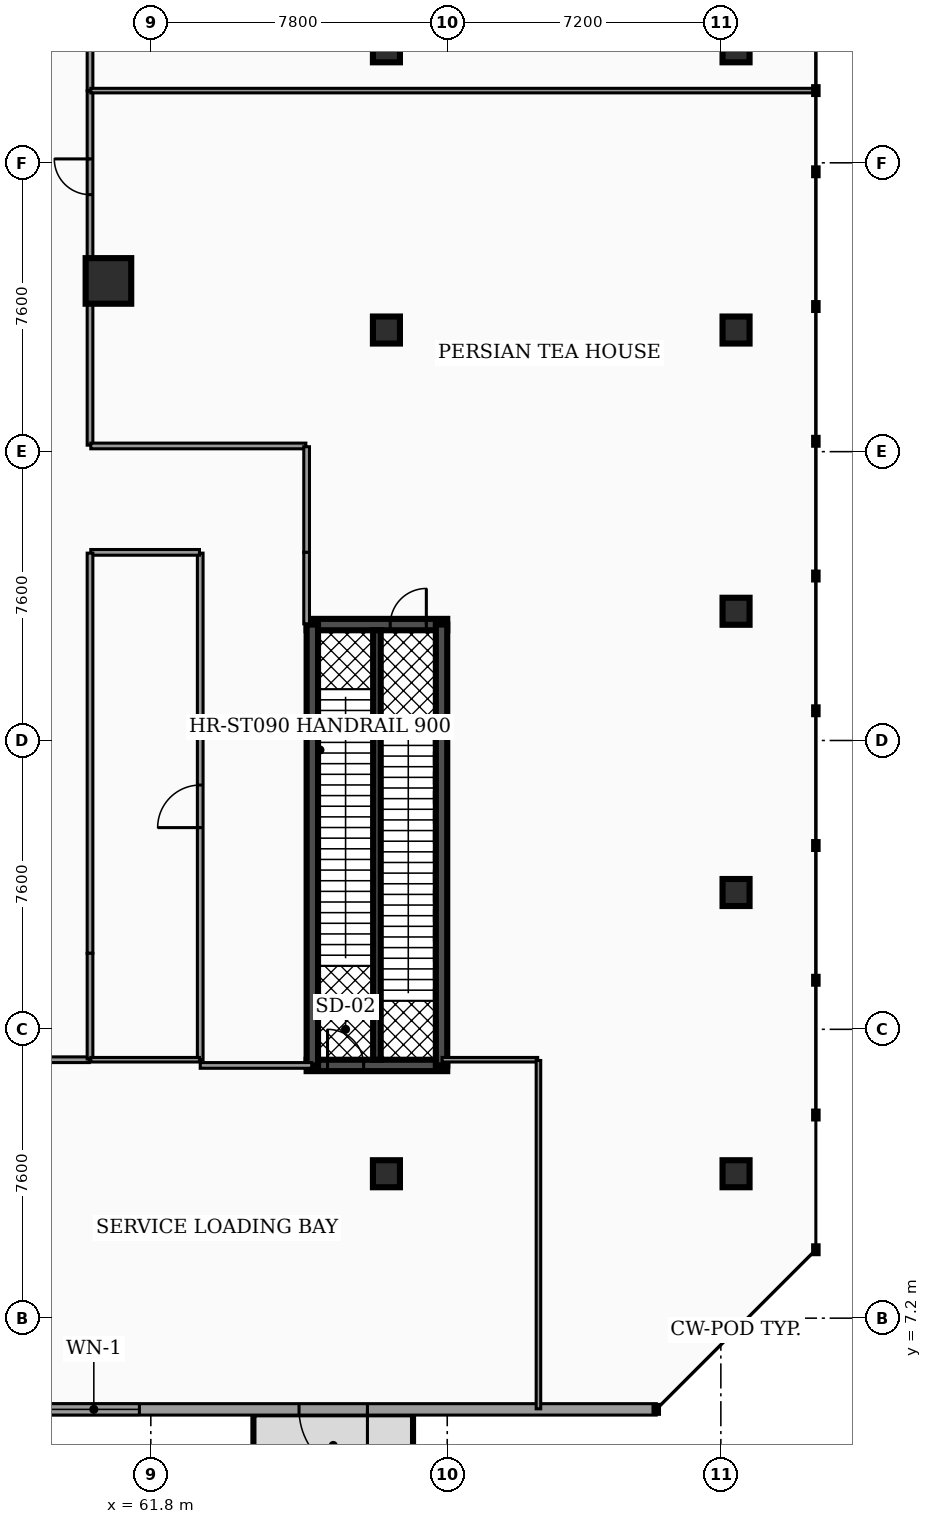
"""IFC4 building model, lengths in metres.
Left out: names, types, materials, properties, quantities, classifications, styles, units other than length and angle.
Written with IfcOpenShell. Run it as: python <this file> out.ifc"""

import sys

from ifc_helpers import new_model, si_unit, direction, frame, frame_2d, origin, origin_2d, place, context, subcontext, project, spatial, rectangle, hollow_rectangle, hollow_circle, extrude, element, fill, save


model = new_model("IFC4")
c1 = context("Model", 3, precision=1e-05, world=origin(), true_north=direction((0.0, 1.0)))
c2 = subcontext(c1, "Body", "Model", "MODEL_VIEW")
j1 = project(units=[si_unit("LENGTHUNIT", "METRE"), si_unit("PLANEANGLEUNIT", "RADIAN")], contexts=[c1])
p1 = place(None, origin())
s1 = spatial("IfcSite", under=j1, at=p1, CompositionType="ELEMENT")
p2 = place(p1, origin())
s2 = spatial("IfcBuilding", under=s1, at=p2, CompositionType="ELEMENT")
p3 = place(p2, origin())
s3 = spatial("IfcBuildingStorey", under=s2, at=p3, CompositionType="ELEMENT", Elevation=0.0)
p4 = place(p3, frame((65.9, 25.45, 0.0), z_axis=(0.0, 0.0, 1.0), x_axis=(1.0, 0.0, 0.0)))
e1 = element("IfcWall", 1, at=p4, inside=s3, PredefinedType="SHEAR", context=c2, shape_type="SweptSolid", body=[
    extrude(rectangle(XDim=3.7, YDim=0.3, at=frame_2d((1.85, 0.0))), origin(), (0.0, 0.0, 1.0), 4.82),
])
p5 = place(p4, frame((2.2, 0.0, 0.0)))
e2 = element("IfcOpeningElement", 2, at=p5, cuts=e1, PredefinedType="OPENING", context=c2, shape_type="SweptSolid", body=[
    extrude(rectangle(XDim=0.95, YDim=2.2, at=frame_2d((0.475, 1.1))), frame((0.0, 0.16, 0.0), z_axis=(0.0, -1.0, 0.0), x_axis=(1.0, 0.0, 0.0)), (0.0, 0.0, 1.0), 0.32),
])
p6 = place(p3, frame((65.9, 13.85, 0.0), z_axis=(0.0, 0.0, 1.0), x_axis=(1.0, 0.0, 0.0)))
e3 = element("IfcWall", 3, at=p6, inside=s3, PredefinedType="SHEAR", context=c2, shape_type="SweptSolid", body=[
    extrude(rectangle(XDim=3.7, YDim=0.3, at=frame_2d((1.85, 0.0))), origin(), (0.0, 0.0, 1.0), 4.82),
])
p7 = place(p6, frame((0.55, 0.0, 0.0)))
e4 = element("IfcOpeningElement", 4, at=p7, cuts=e3, PredefinedType="OPENING", context=c2, shape_type="SweptSolid", body=[
    extrude(rectangle(XDim=0.95, YDim=2.2, at=frame_2d((0.475, 1.1))), frame((0.0, 0.16, 0.0), z_axis=(0.0, -1.0, 0.0), x_axis=(1.0, 0.0, 0.0)), (0.0, 0.0, 1.0), 0.32),
])
for number, where, z_axis, x_axis in (
    (5, (66.05, 13.85, 0.0), (0.0, 0.0, 1.0), (0.0, 1.0, 0.0)),
    (6, (69.45, 13.85, 0.0), (0.0, 0.0, 1.0), (0.0, 1.0, 0.0)),
):
    element("IfcWall", number, at=place(p3, frame(where, z_axis=z_axis, x_axis=x_axis)), inside=s3, PredefinedType="SHEAR", context=c2, shape_type="SweptSolid", body=[
        extrude(rectangle(XDim=11.6, YDim=0.3, at=frame_2d((5.8, 0.0))), origin(), (0.0, 0.0, 1.0), 4.82),
    ])
p8 = place(p3, frame((67.75, 14.0, 0.0), z_axis=(0.0, 0.0, 1.0), x_axis=(0.0, 1.0, 0.0)))
e7 = element("IfcWall", 7, at=p8, inside=s3, PredefinedType="SHEAR", context=c2, shape_type="SweptSolid", body=[
    extrude(rectangle(XDim=11.3, YDim=0.2, at=frame_2d((5.65, 0.0))), origin(), (0.0, 0.0, 1.0), 4.82),
])
p9 = place(p3, frame((60.685, 34.492, 0.0), z_axis=(0.0, 0.0, 1.0), x_axis=(1.0, 0.0, 0.0)))
e8 = element("IfcColumn", 8, at=p9, inside=s3, PredefinedType="COLUMN", context=c2, shape_type="SweptSolid", body=[
    extrude(hollow_rectangle(XDim=1.2, YDim=1.2, WallThickness=0.06, at=origin_2d()), origin(), (0.0, 0.0, 1.0), 4.82),
])
for number, where, z_axis, x_axis in (
    (9, (77.2, 11.0, 0.0), (0.0, 0.0, 1.0), (1.0, 0.0, 0.0)),
    (10, (68.0, 11.0, 0.0), (0.0, 0.0, 1.0), (1.0, 0.0, 0.0)),
    (11, (77.2, 33.2, 0.0), (0.0, 0.0, 1.0), (1.0, 0.0, 0.0)),
    (12, (68.0, 33.2, 0.0), (0.0, 0.0, 1.0), (1.0, 0.0, 0.0)),
    (13, (77.2, 40.6, 0.0), (0.0, 0.0, 1.0), (1.0, 0.0, 0.0)),
    (14, (68.0, 40.6, 0.0), (0.0, 0.0, 1.0), (1.0, 0.0, 0.0)),
    (15, (77.2, 18.4, 0.0), (0.0, 0.0, 1.0), (1.0, 0.0, 0.0)),
    (16, (77.2, 25.8, 0.0), (0.0, 0.0, 1.0), (1.0, 0.0, 0.0)),
):
    element("IfcColumn", number, at=place(p3, frame(where, z_axis=z_axis, x_axis=x_axis)), inside=s3, PredefinedType="COLUMN", context=c2, shape_type="SweptSolid", body=[
        extrude(hollow_circle(Radius=0.355, WallThickness=0.03, at=origin_2d()), origin(), (0.0, 0.0, 1.0), 4.82),
    ])
p10 = place(p3, frame((75.1, 4.8, 0.0), z_axis=(0.0, 0.0, 1.0), x_axis=(-1.0, 0.0, 0.0)))
e17 = element("IfcWall", 17, at=p10, inside=s3, PredefinedType="STANDARD", context=c2, shape_type="SweptSolid", body=[
    extrude(rectangle(XDim=73.4, YDim=0.3, at=frame_2d((36.7, 0.0))), origin(), (0.0, 0.0, 1.0), 4.205),
])
p11 = place(p10, frame((65.3, 0.0, 0.0)))
e18 = element("IfcOpeningElement", 18, at=p11, cuts=e17, PredefinedType="OPENING", context=c2, shape_type="SweptSolid", body=[
    extrude(rectangle(XDim=4.4, YDim=3.5, at=frame_2d((2.2, 1.75))), frame((0.0, 0.16, 0.0), z_axis=(0.0, -1.0, 0.0), x_axis=(1.0, 0.0, 0.0)), (0.0, 0.0, 1.0), 0.32),
])
p12 = place(p10, frame((31.15, 0.0, 0.0)))
e19 = element("IfcOpeningElement", 19, at=p12, cuts=e17, PredefinedType="OPENING", context=c2, shape_type="SweptSolid", body=[
    extrude(rectangle(XDim=2.4, YDim=2.6, at=frame_2d((1.2, 1.3))), frame((0.0, 0.16, 0.0), z_axis=(0.0, -1.0, 0.0), x_axis=(1.0, 0.0, 0.0)), (0.0, 0.0, 1.0), 0.32),
])
p13 = place(p10, frame((50.6, 0.0, 0.0)))
e20 = element("IfcOpeningElement", 20, at=p13, cuts=e17, PredefinedType="OPENING", context=c2, shape_type="SweptSolid", body=[
    extrude(rectangle(XDim=1.6, YDim=2.4, at=frame_2d((0.8, 1.2))), frame((0.0, 0.16, 0.0), z_axis=(0.0, -1.0, 0.0), x_axis=(1.0, 0.0, 0.0)), (0.0, 0.0, 1.0), 0.32),
])
p14 = place(p10, frame((23.0, 0.0, 0.0)))
e21 = element("IfcOpeningElement", 21, at=p14, cuts=e17, PredefinedType="OPENING", context=c2, shape_type="SweptSolid", body=[
    extrude(rectangle(XDim=1.6, YDim=2.4, at=frame_2d((0.8, 1.2))), frame((0.0, 0.16, 0.0), z_axis=(0.0, -1.0, 0.0), x_axis=(1.0, 0.0, 0.0)), (0.0, 0.0, 1.0), 0.32),
])
p15 = place(p10, frame((7.6, 0.0, 0.0)))
e22 = element("IfcOpeningElement", 22, at=p15, cuts=e17, PredefinedType="OPENING", context=c2, shape_type="SweptSolid", body=[
    extrude(rectangle(XDim=1.8, YDim=2.4, at=frame_2d((0.9, 1.2))), frame((0.0, 0.16, 0.0), z_axis=(0.0, -1.0, 0.0), x_axis=(1.0, 0.0, 0.0)), (0.0, 0.0, 1.0), 0.32),
])
p16 = place(p10, frame((17.1, 0.0, 0.0)))
e23 = element("IfcOpeningElement", 23, at=p16, cuts=e17, PredefinedType="OPENING", context=c2, shape_type="SweptSolid", body=[
    extrude(rectangle(XDim=1.8, YDim=2.4, at=frame_2d((0.9, 1.2))), frame((0.0, 0.16, 0.0), z_axis=(0.0, -1.0, 0.0), x_axis=(1.0, 0.0, 0.0)), (0.0, 0.0, 1.0), 0.32),
])
p17 = place(p10, frame((59.75, 0.0, 0.0)))
e24 = element("IfcOpeningElement", 24, at=p17, cuts=e17, PredefinedType="OPENING", context=c2, shape_type="SweptSolid", body=[
    extrude(rectangle(XDim=1.8, YDim=2.4, at=frame_2d((0.9, 1.2))), frame((0.0, 0.16, 0.0), z_axis=(0.0, -1.0, 0.0), x_axis=(1.0, 0.0, 0.0)), (0.0, 0.0, 1.0), 0.32),
])
p18 = place(p10, frame((13.6, 0.0, 0.9)))
e25 = element("IfcOpeningElement", 25, at=p18, cuts=e17, PredefinedType="OPENING", context=c2, shape_type="SweptSolid", body=[
    extrude(rectangle(XDim=2.4, YDim=2.5, at=frame_2d((1.2, 1.25))), frame((0.0, 0.16, 0.0), z_axis=(0.0, -1.0, 0.0), x_axis=(1.0, 0.0, 0.0)), (0.0, 0.0, 1.0), 0.32),
])
p19 = place(p10, frame((28.15, 0.0, 0.9)))
e26 = element("IfcOpeningElement", 26, at=p19, cuts=e17, PredefinedType="OPENING", context=c2, shape_type="SweptSolid", body=[
    extrude(rectangle(XDim=2.4, YDim=2.5, at=frame_2d((1.2, 1.25))), frame((0.0, 0.16, 0.0), z_axis=(0.0, -1.0, 0.0), x_axis=(1.0, 0.0, 0.0)), (0.0, 0.0, 1.0), 0.32),
])
p20 = place(p10, frame((44.1, 0.0, 0.9)))
e27 = element("IfcOpeningElement", 27, at=p20, cuts=e17, PredefinedType="OPENING", context=c2, shape_type="SweptSolid", body=[
    extrude(rectangle(XDim=2.4, YDim=2.5, at=frame_2d((1.2, 1.25))), frame((0.0, 0.16, 0.0), z_axis=(0.0, -1.0, 0.0), x_axis=(1.0, 0.0, 0.0)), (0.0, 0.0, 1.0), 0.32),
])
p21 = place(p3, frame((63.1, 13.85, 0.0), z_axis=(0.0, 0.0, 1.0), x_axis=(1.0, 0.0, 0.0)))
e28 = element("IfcWall", 28, at=p21, inside=s3, PredefinedType="PARTITIONING", context=c2, shape_type="SweptSolid", body=[
    extrude(rectangle(XDim=2.935, YDim=0.15, at=frame_2d((1.467, 0.0))), origin(), (0.0, 0.0, 1.0), 3.777),
])
p22 = place(p3, frame((57.2, 14.0, 0.0), z_axis=(0.0, 0.0, 1.0), x_axis=(1.0, 0.0, 0.0)))
e29 = element("IfcWall", 29, at=p22, inside=s3, PredefinedType="PARTITIONING", context=c2, shape_type="SweptSolid", body=[
    extrude(rectangle(XDim=2.98, YDim=0.15, at=frame_2d((1.49, 0.0))), origin(), (0.0, 0.0, 1.0), 3.777),
])
p23 = place(p3, frame((63.1, 14.005, 0.0), z_axis=(0.0, 0.0, 1.0), x_axis=(0.0, 1.0, 0.0)))
e30 = element("IfcWall", 30, at=p23, inside=s3, PredefinedType="PARTITIONING", context=c2, shape_type="SweptSolid", body=[
    extrude(rectangle(XDim=13.325, YDim=0.15, at=frame_2d((6.663, 0.0))), origin(), (0.0, 0.0, 1.0), 3.777),
])
p24 = place(p23, frame((6.103, 0.0, 0.0)))
e31 = element("IfcOpeningElement", 31, at=p24, cuts=e30, PredefinedType="OPENING", context=c2, shape_type="SweptSolid", body=[
    extrude(rectangle(XDim=1.12, YDim=2.05, at=frame_2d((0.56, 1.025))), frame((0.0, 0.085, 0.0), z_axis=(0.0, -1.0, 0.0), x_axis=(1.0, 0.0, 0.0)), (0.0, 0.0, 1.0), 0.17),
])
p25 = place(p3, frame((60.22, 27.35, 0.0), z_axis=(0.0, 0.0, 1.0), x_axis=(1.0, 0.0, 0.0)))
e32 = element("IfcWall", 32, at=p25, inside=s3, PredefinedType="PARTITIONING", context=c2, shape_type="SweptSolid", body=[
    extrude(rectangle(XDim=2.86, YDim=0.15, at=frame_2d((1.43, 0.0))), origin(), (0.0, 0.0, 1.0), 3.777),
])
p26 = place(p3, frame((60.2, 16.8, 0.0), z_axis=(0.0, 0.0, 1.0), x_axis=(0.0, 1.0, 0.0)))
e33 = element("IfcWall", 33, at=p26, inside=s3, PredefinedType="PARTITIONING", context=c2, shape_type="SweptSolid", body=[
    extrude(rectangle(XDim=10.53, YDim=0.15, at=frame_2d((5.265, 0.0))), origin(), (0.0, 0.0, 1.0), 3.777),
])
p27 = place(p3, frame((60.2, 14.02, 0.0), z_axis=(0.0, 0.0, 1.0), x_axis=(0.0, 1.0, 0.0)))
e34 = element("IfcWall", 34, at=p27, inside=s3, PredefinedType="PARTITIONING", context=c2, shape_type="SweptSolid", body=[
    extrude(rectangle(XDim=2.78, YDim=0.15, at=frame_2d((1.39, 0.0))), origin(), (0.0, 0.0, 1.0), 3.777),
])
p28 = place(p3, frame((60.2, 30.17, 0.0), z_axis=(0.0, 0.0, 1.0), x_axis=(0.0, 1.0, 0.0)))
e35 = element("IfcWall", 35, at=p28, inside=s3, PredefinedType="PARTITIONING", context=c2, shape_type="SweptSolid", body=[
    extrude(rectangle(XDim=9.325, YDim=0.15, at=frame_2d((4.663, 0.0))), origin(), (0.0, 0.0, 1.0), 3.777),
])
p29 = place(p28, frame((6.593, 0.0, 0.0)))
e36 = element("IfcOpeningElement", 36, at=p29, cuts=e35, PredefinedType="OPENING", context=c2, shape_type="SweptSolid", body=[
    extrude(rectangle(XDim=0.94, YDim=2.05, at=frame_2d((0.47, 1.025))), frame((0.0, 0.085, 0.0), z_axis=(0.0, -1.0, 0.0), x_axis=(1.0, 0.0, 0.0)), (0.0, 0.0, 1.0), 0.17),
])
p30 = place(p3, frame((60.22, 30.15, 0.0), z_axis=(0.0, 0.0, 1.0), x_axis=(1.0, 0.0, 0.0)))
e37 = element("IfcWall", 37, at=p30, inside=s3, PredefinedType="PARTITIONING", context=c2, shape_type="SweptSolid", body=[
    extrude(rectangle(XDim=5.66, YDim=0.15, at=frame_2d((2.83, 0.0))), origin(), (0.0, 0.0, 1.0), 3.777),
])
p31 = place(p3, frame((65.9, 27.35, 0.0), z_axis=(0.0, 0.0, 1.0), x_axis=(0.0, 1.0, 0.0)))
e38 = element("IfcWall", 38, at=p31, inside=s3, PredefinedType="PARTITIONING", context=c2, shape_type="SweptSolid", body=[
    extrude(rectangle(XDim=2.78, YDim=0.15, at=frame_2d((1.39, 0.0))), origin(), (0.0, 0.0, 1.0), 3.777),
])
p32 = place(p3, frame((65.9, 25.47, 0.0), z_axis=(0.0, 0.0, 1.0), x_axis=(0.0, 1.0, 0.0)))
e39 = element("IfcWall", 39, at=p32, inside=s3, PredefinedType="PARTITIONING", context=c2, shape_type="SweptSolid", body=[
    extrude(rectangle(XDim=1.88, YDim=0.15, at=frame_2d((0.94, 0.0))), origin(), (0.0, 0.0, 1.0), 3.777),
])
p33 = place(p3, frame((60.2, 39.505, 0.0), z_axis=(0.0, 0.0, 1.0), x_axis=(0.0, 1.0, 0.0)))
e40 = element("IfcWall", 40, at=p33, inside=s3, PredefinedType="PARTITIONING", context=c2, shape_type="SweptSolid", body=[
    extrude(rectangle(XDim=4.045, YDim=0.15, at=frame_2d((2.022, 0.0))), origin(), (0.0, 0.0, 1.0), 3.777),
])
p34 = place(p33, frame((1.552, 0.0, 0.0)))
e41 = element("IfcOpeningElement", 41, at=p34, cuts=e40, PredefinedType="OPENING", context=c2, shape_type="SweptSolid", body=[
    extrude(rectangle(XDim=0.94, YDim=2.05, at=frame_2d((0.47, 1.025))), frame((0.0, 0.085, 0.0), z_axis=(0.0, -1.0, 0.0), x_axis=(1.0, 0.0, 0.0)), (0.0, 0.0, 1.0), 0.17),
])
p35 = place(p3, frame((60.22, 14.0, 0.0), z_axis=(0.0, 0.0, 1.0), x_axis=(1.0, 0.0, 0.0)))
e42 = element("IfcWall", 42, at=p35, inside=s3, PredefinedType="PARTITIONING", context=c2, shape_type="SweptSolid", body=[
    extrude(rectangle(XDim=2.86, YDim=0.12, at=frame_2d((1.43, 0.0))), origin(), (0.0, 0.0, 1.0), 3.777),
])
p36 = place(p3, frame((69.465, 14.0, 0.0), z_axis=(0.0, 0.0, 1.0), x_axis=(1.0, 0.0, 0.0)))
e43 = element("IfcWall", 43, at=p36, inside=s3, PredefinedType="PARTITIONING", context=c2, shape_type="SweptSolid", body=[
    extrude(rectangle(XDim=2.515, YDim=0.12, at=frame_2d((1.257, 0.0))), origin(), (0.0, 0.0, 1.0), 3.777),
])
p37 = place(p3, frame((72.0, 4.815, 0.0), z_axis=(0.0, 0.0, 1.0), x_axis=(0.0, 1.0, 0.0)))
e44 = element("IfcWall", 44, at=p37, inside=s3, PredefinedType="PARTITIONING", context=c2, shape_type="SweptSolid", body=[
    extrude(rectangle(XDim=9.165, YDim=0.12, at=frame_2d((4.583, 0.0))), origin(), (0.0, 0.0, 1.0), 3.777),
])
p38 = place(p3, frame((60.22, 39.5, 0.0), z_axis=(0.0, 0.0, 1.0), x_axis=(1.0, 0.0, 0.0)))
e45 = element("IfcWall", 45, at=p38, inside=s3, PredefinedType="PARTITIONING", context=c2, shape_type="SweptSolid", body=[
    extrude(rectangle(XDim=19.065, YDim=0.12, at=frame_2d((9.532, 0.0))), origin(), (0.0, 0.0, 1.0), 3.777),
])
p39 = place(p15, origin())
e46 = element("IfcDoor", 46, at=p39, inside=s3, OperationType="SINGLE_SWING_LEFT", PredefinedType="DOOR", context=c2, shape_type="SweptSolid", body=[
    extrude(rectangle(XDim=1.8, YDim=2.4, at=frame_2d((0.9, 1.2))), frame((0.0, 0.025, 0.0), z_axis=(0.0, -1.0, 0.0), x_axis=(1.0, 0.0, 0.0)), (0.0, 0.0, 1.0), 0.05),
])
fill(e22, e46)
p40 = place(p18, origin())
e47 = element("IfcWindow", 47, at=p40, inside=s3, PartitioningType="SINGLE_PANEL", PredefinedType="WINDOW", context=c2, shape_type="SweptSolid", body=[
    extrude(rectangle(XDim=2.4, YDim=2.5, at=frame_2d((1.2, 1.25))), frame((0.0, 0.03, 0.0), z_axis=(0.0, -1.0, 0.0), x_axis=(1.0, 0.0, 0.0)), (0.0, 0.0, 1.0), 0.06),
])
fill(e25, e47)
p41 = place(p7, origin())
e48 = element("IfcDoor", 48, at=p41, inside=s3, OperationType="SINGLE_SWING_LEFT", PredefinedType="DOOR", context=c2, shape_type="SweptSolid", body=[
    extrude(rectangle(XDim=0.95, YDim=2.2, at=frame_2d((0.475, 1.1))), frame((0.0, 0.025, 0.0), z_axis=(0.0, -1.0, 0.0), x_axis=(1.0, 0.0, 0.0)), (0.0, 0.0, 1.0), 0.05),
])
fill(e4, e48)
p42 = place(p5, origin())
e49 = element("IfcDoor", 49, at=p42, inside=s3, OperationType="SINGLE_SWING_RIGHT", PredefinedType="DOOR", context=c2, shape_type="SweptSolid", body=[
    extrude(rectangle(XDim=0.95, YDim=2.2, at=frame_2d((0.475, 1.1))), frame((0.0, 0.025, 0.0), z_axis=(0.0, -1.0, 0.0), x_axis=(1.0, 0.0, 0.0)), (0.0, 0.0, 1.0), 0.05),
])
fill(e2, e49)
p43 = place(p24, origin())
e50 = element("IfcDoor", 50, at=p43, inside=s3, OperationType="SINGLE_SWING_LEFT", PredefinedType="DOOR", context=c2, shape_type="SweptSolid", body=[
    extrude(rectangle(XDim=1.12, YDim=2.05, at=frame_2d((0.56, 1.025))), frame((0.0, 0.025, 0.0), z_axis=(0.0, -1.0, 0.0), x_axis=(1.0, 0.0, 0.0)), (0.0, 0.0, 1.0), 0.05),
])
fill(e31, e50)
p44 = place(p29, origin())
e51 = element("IfcDoor", 51, at=p44, inside=s3, OperationType="SINGLE_SWING_RIGHT", PredefinedType="DOOR", context=c2, shape_type="SweptSolid", body=[
    extrude(rectangle(XDim=0.94, YDim=2.05, at=frame_2d((0.47, 1.025))), frame((0.0, 0.025, 0.0), z_axis=(0.0, -1.0, 0.0), x_axis=(1.0, 0.0, 0.0)), (0.0, 0.0, 1.0), 0.05),
])
fill(e36, e51)
save(model, sys.argv[1])
